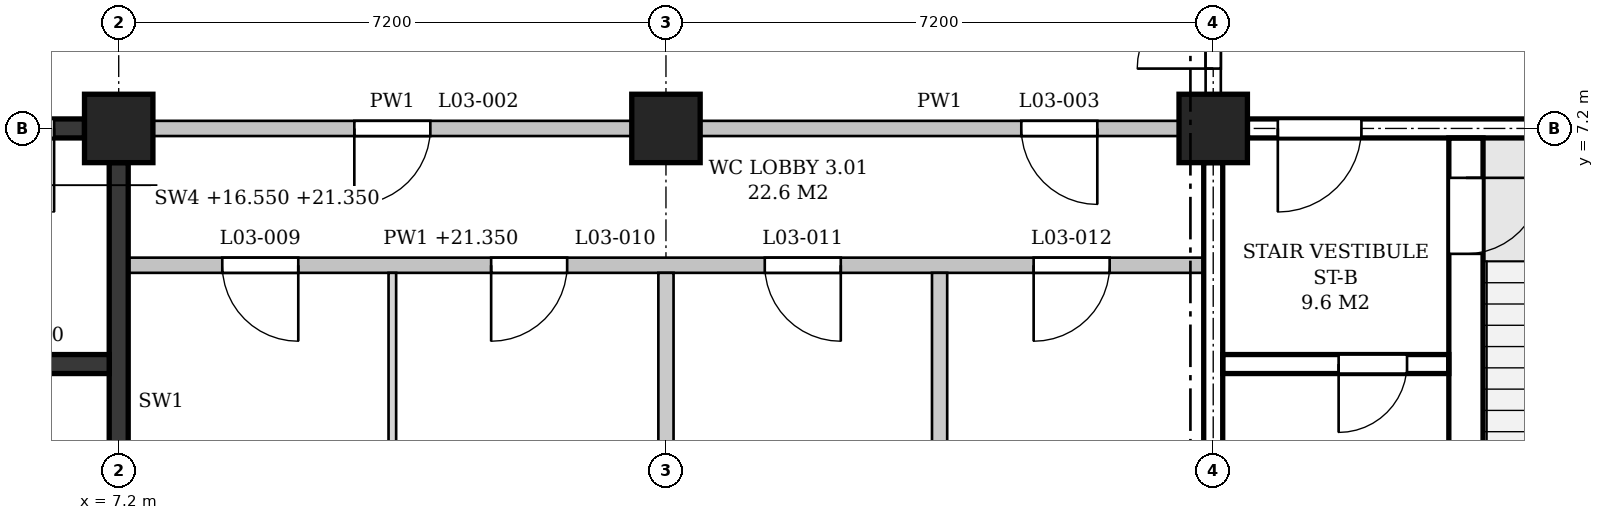
"""IFC4 building model, lengths in metres.
Left out: names, types, materials, properties, quantities, classifications, styles, units other than length and angle.
Written with IfcOpenShell. Run it as: python <this file> out.ifc"""

import sys

from ifc_helpers import new_model, si_unit, direction, frame, frame_2d, origin, origin_2d, place, context, subcontext, project, spatial, polyline, rectangle, outline, extrude, element, fill, save


model = new_model("IFC4")
c1 = context("Model", 3, precision=1e-05, world=origin(), true_north=direction((0.0, 1.0)))
c2 = subcontext(c1, "Body", "Model", "MODEL_VIEW")
j1 = project(units=[si_unit("LENGTHUNIT", "METRE"), si_unit("PLANEANGLEUNIT", "RADIAN")], contexts=[c1])
p1 = place(None, origin())
s1 = spatial("IfcSite", under=j1, at=p1, CompositionType="ELEMENT")
p2 = place(p1, origin())
s2 = spatial("IfcBuilding", under=s1, at=p2, CompositionType="ELEMENT")
p3 = place(p2, frame((0.0, 0.0, 16.8)))
s3 = spatial("IfcBuildingStorey", under=s2, at=p3, CompositionType="ELEMENT", Elevation=16.8)
for number, where, z_axis, x_axis in (
    (1, (7.2, 7.2, 0.0), (0.0, 0.0, 1.0), (1.0, 0.0, 0.0)),
    (2, (14.4, 7.2, 0.0), (0.0, 0.0, 1.0), (1.0, 0.0, 0.0)),
    (3, (21.6, 7.2, 0.0), (0.0, 0.0, 1.0), (1.0, 0.0, 0.0)),
):
    element("IfcColumn", number, at=place(p3, frame(where, z_axis=z_axis, x_axis=x_axis)), inside=s3, PredefinedType="COLUMN", context=c2, shape_type="SweptSolid", body=[
        extrude(rectangle(XDim=0.9, YDim=0.9, at=origin_2d()), origin(), (0.0, 0.0, 1.0), 4.8),
    ])
p4 = place(p3, frame((0.45, 7.2, 0.0), z_axis=(0.0, 0.0, 1.0), x_axis=(1.0, 0.0, 0.0)))
e4 = element("IfcWall", 4, at=p4, inside=s3, PredefinedType="SHEAR", context=c2, shape_type="SweptSolid", body=[
    extrude(rectangle(XDim=6.3, YDim=0.25, at=frame_2d((3.15, 0.0))), origin(), (0.0, 0.0, 1.0), 3.8),
])
p5 = place(p4, frame((4.8, 0.0, 0.0)))
e5 = element("IfcOpeningElement", 5, at=p5, cuts=e4, PredefinedType="OPENING", context=c2, shape_type="SweptSolid", body=[
    extrude(rectangle(XDim=1.1, YDim=2.1, at=frame_2d((0.55, 1.05))), frame((0.0, 0.135, 0.0), z_axis=(0.0, -1.0, 0.0), x_axis=(1.0, 0.0, 0.0)), (0.0, 0.0, 1.0), 0.27),
])
p6 = place(p3, frame((7.2, 0.45, 0.0), z_axis=(0.0, 0.0, 1.0), x_axis=(0.0, 1.0, 0.0)))
e6 = element("IfcWall", 6, at=p6, inside=s3, PredefinedType="SHEAR", context=c2, shape_type="SweptSolid", body=[
    extrude(rectangle(XDim=6.3, YDim=0.25, at=frame_2d((3.15, 0.0))), origin(), (0.0, 0.0, 1.0), 3.8),
])
p7 = place(p3, frame((4.1, 4.1, 0.0), z_axis=(0.0, 0.0, 1.0), x_axis=(1.0, 0.0, 0.0)))
e7 = element("IfcWall", 7, at=p7, inside=s3, PredefinedType="SHEAR", context=c2, shape_type="SweptSolid", body=[
    extrude(rectangle(XDim=2.975, YDim=0.25, at=frame_2d((1.487, 0.0))), origin(), (0.0, 0.0, 1.0), 4.55),
])
p8 = place(p7, frame((0.55, 0.0, 0.0)))
e8 = element("IfcOpeningElement", 8, at=p8, cuts=e7, PredefinedType="OPENING", context=c2, shape_type="SweptSolid", body=[
    extrude(rectangle(XDim=0.9, YDim=2.1, at=frame_2d((0.45, 1.05))), frame((0.0, 0.135, 0.0), z_axis=(0.0, -1.0, 0.0), x_axis=(1.0, 0.0, 0.0)), (0.0, 0.0, 1.0), 0.27),
])
p9 = place(p3, frame((22.05, 7.2, 0.0), z_axis=(0.0, 0.0, 1.0), x_axis=(1.0, 0.0, 0.0)))
e9 = element("IfcWall", 9, at=p9, inside=s3, PredefinedType="SHEAR", context=c2, shape_type="SweptSolid", body=[
    extrude(rectangle(XDim=6.3, YDim=0.25, at=frame_2d((3.15, 0.0))), origin(), (0.0, 0.0, 1.0), 3.8),
])
p10 = place(p9, frame((0.4, 0.0, 0.0)))
e10 = element("IfcOpeningElement", 10, at=p10, cuts=e9, PredefinedType="OPENING", context=c2, shape_type="SweptSolid", body=[
    extrude(rectangle(XDim=1.1, YDim=2.1, at=frame_2d((0.55, 1.05))), frame((0.0, 0.135, 0.0), z_axis=(0.0, -1.0, 0.0), x_axis=(1.0, 0.0, 0.0)), (0.0, 0.0, 1.0), 0.27),
])
p11 = place(p3, frame((21.6, 0.45, 0.0), z_axis=(0.0, 0.0, 1.0), x_axis=(0.0, 1.0, 0.0)))
e11 = element("IfcWall", 11, at=p11, inside=s3, PredefinedType="SHEAR", context=c2, shape_type="SweptSolid", body=[
    extrude(rectangle(XDim=6.3, YDim=0.25, at=frame_2d((3.15, 0.0))), origin(), (0.0, 0.0, 1.0), 3.8),
])
p12 = place(p3, frame((24.925, 0.225, 0.0), z_axis=(0.0, 0.0, 1.0), x_axis=(0.0, 1.0, 0.0)))
e12 = element("IfcWall", 12, at=p12, inside=s3, PredefinedType="SHEAR", context=c2, shape_type="SweptSolid", body=[
    extrude(rectangle(XDim=6.85, YDim=0.45, at=frame_2d((3.425, 0.0))), origin(), (0.0, 0.0, 1.0), 4.55),
])
p13 = place(p12, frame((5.325, 0.0, 0.0)))
e13 = element("IfcOpeningElement", 13, at=p13, cuts=e12, PredefinedType="OPENING", context=c2, shape_type="SweptSolid", body=[
    extrude(rectangle(XDim=1.0, YDim=2.1, at=frame_2d((0.5, 1.05))), frame((0.0, 0.235, 0.0), z_axis=(0.0, -1.0, 0.0), x_axis=(1.0, 0.0, 0.0)), (0.0, 0.0, 1.0), 0.47),
])
p14 = place(p3, frame((21.725, 4.1, 0.0), z_axis=(0.0, 0.0, 1.0), x_axis=(1.0, 0.0, 0.0)))
e14 = element("IfcWall", 14, at=p14, inside=s3, PredefinedType="SHEAR", context=c2, shape_type="SweptSolid", body=[
    extrude(rectangle(XDim=2.975, YDim=0.25, at=frame_2d((1.487, 0.0))), origin(), (0.0, 0.0, 1.0), 4.55),
])
p15 = place(p14, frame((1.525, 0.0, 0.0)))
e15 = element("IfcOpeningElement", 15, at=p15, cuts=e14, PredefinedType="OPENING", context=c2, shape_type="SweptSolid", body=[
    extrude(rectangle(XDim=0.9, YDim=2.1, at=frame_2d((0.45, 1.05))), frame((0.0, 0.135, 0.0), z_axis=(0.0, -1.0, 0.0), x_axis=(1.0, 0.0, 0.0)), (0.0, 0.0, 1.0), 0.27),
])
p16 = place(p3, frame((7.325, 5.4, 0.0), z_axis=(0.0, 0.0, 1.0), x_axis=(1.0, 0.0, 0.0)))
e16 = element("IfcWall", 16, at=p16, inside=s3, PredefinedType="PARTITIONING", context=c2, shape_type="SweptSolid", body=[
    extrude(outline(polyline([(0.0, 0.0), (14.15, 0.0), (14.15, 3.8), (14.025, 3.8), (14.025, 4.55), (7.325, 4.55), (7.325, 3.8), (6.825, 3.8), (6.825, 4.55), (0.125, 4.55), (0.125, 3.8), (0.0, 3.8), (0.0, 0.0)])), frame((0.0, 0.1, 0.0), z_axis=(0.0, -1.0, 0.0), x_axis=(1.0, 0.0, 0.0)), (0.0, 0.0, 1.0), 0.2),
])
p17 = place(p16, frame((1.238, 0.0, 0.0)))
e17 = element("IfcOpeningElement", 17, at=p17, cuts=e16, PredefinedType="OPENING", context=c2, shape_type="SweptSolid", body=[
    extrude(rectangle(XDim=1.0, YDim=2.1, at=frame_2d((0.5, 1.05))), frame((0.0, 0.11, 0.0), z_axis=(0.0, -1.0, 0.0), x_axis=(1.0, 0.0, 0.0)), (0.0, 0.0, 1.0), 0.22),
])
p18 = place(p16, frame((4.775, 0.0, 0.0)))
e18 = element("IfcOpeningElement", 18, at=p18, cuts=e16, PredefinedType="OPENING", context=c2, shape_type="SweptSolid", body=[
    extrude(rectangle(XDim=1.0, YDim=2.1, at=frame_2d((0.5, 1.05))), frame((0.0, 0.11, 0.0), z_axis=(0.0, -1.0, 0.0), x_axis=(1.0, 0.0, 0.0)), (0.0, 0.0, 1.0), 0.22),
])
p19 = place(p16, frame((8.375, 0.0, 0.0)))
e19 = element("IfcOpeningElement", 19, at=p19, cuts=e16, PredefinedType="OPENING", context=c2, shape_type="SweptSolid", body=[
    extrude(rectangle(XDim=1.0, YDim=2.1, at=frame_2d((0.5, 1.05))), frame((0.0, 0.11, 0.0), z_axis=(0.0, -1.0, 0.0), x_axis=(1.0, 0.0, 0.0)), (0.0, 0.0, 1.0), 0.22),
])
p20 = place(p16, frame((11.913, 0.0, 0.0)))
e20 = element("IfcOpeningElement", 20, at=p20, cuts=e16, PredefinedType="OPENING", context=c2, shape_type="SweptSolid", body=[
    extrude(rectangle(XDim=1.0, YDim=2.1, at=frame_2d((0.5, 1.05))), frame((0.0, 0.11, 0.0), z_axis=(0.0, -1.0, 0.0), x_axis=(1.0, 0.0, 0.0)), (0.0, 0.0, 1.0), 0.22),
])
p21 = place(p3, frame((7.65, 7.2, 0.0), z_axis=(0.0, 0.0, 1.0), x_axis=(1.0, 0.0, 0.0)))
e21 = element("IfcWall", 21, at=p21, inside=s3, PredefinedType="PARTITIONING", context=c2, shape_type="SweptSolid", body=[
    extrude(rectangle(XDim=6.3, YDim=0.2, at=frame_2d((3.15, 0.0))), origin(), (0.0, 0.0, 1.0), 3.8),
])
p22 = place(p21, frame((2.65, 0.0, 0.0)))
e22 = element("IfcOpeningElement", 22, at=p22, cuts=e21, PredefinedType="OPENING", context=c2, shape_type="SweptSolid", body=[
    extrude(rectangle(XDim=1.0, YDim=2.1, at=frame_2d((0.5, 1.05))), frame((0.0, 0.11, 0.0), z_axis=(0.0, -1.0, 0.0), x_axis=(1.0, 0.0, 0.0)), (0.0, 0.0, 1.0), 0.22),
])
p23 = place(p3, frame((14.85, 7.2, 0.0), z_axis=(0.0, 0.0, 1.0), x_axis=(1.0, 0.0, 0.0)))
e23 = element("IfcWall", 23, at=p23, inside=s3, PredefinedType="PARTITIONING", context=c2, shape_type="SweptSolid", body=[
    extrude(rectangle(XDim=6.3, YDim=0.2, at=frame_2d((3.15, 0.0))), origin(), (0.0, 0.0, 1.0), 3.8),
])
p24 = place(p23, frame((4.225, 0.0, 0.0)))
e24 = element("IfcOpeningElement", 24, at=p24, cuts=e23, PredefinedType="OPENING", context=c2, shape_type="SweptSolid", body=[
    extrude(rectangle(XDim=1.0, YDim=2.1, at=frame_2d((0.5, 1.05))), frame((0.0, 0.11, 0.0), z_axis=(0.0, -1.0, 0.0), x_axis=(1.0, 0.0, 0.0)), (0.0, 0.0, 1.0), 0.22),
])
p25 = place(p3, frame((10.8, 0.15, 0.0), z_axis=(0.0, 0.0, 1.0), x_axis=(0.0, 1.0, 0.0)))
e25 = element("IfcWall", 25, at=p25, inside=s3, PredefinedType="PARTITIONING", context=c2, shape_type="SweptSolid", body=[
    extrude(rectangle(XDim=5.15, YDim=0.1, at=frame_2d((2.575, 0.0))), origin(), (0.0, 0.0, 1.0), 3.8),
])
p26 = place(p3, frame((14.4, 0.45, 0.0), z_axis=(0.0, 0.0, 1.0), x_axis=(0.0, 1.0, 0.0)))
e26 = element("IfcWall", 26, at=p26, inside=s3, PredefinedType="PARTITIONING", context=c2, shape_type="SweptSolid", body=[
    extrude(rectangle(XDim=4.85, YDim=0.2, at=frame_2d((2.425, 0.0))), origin(), (0.0, 0.0, 1.0), 3.8),
])
p27 = place(p3, frame((18.0, 0.15, 0.0), z_axis=(0.0, 0.0, 1.0), x_axis=(0.0, 1.0, 0.0)))
e27 = element("IfcWall", 27, at=p27, inside=s3, PredefinedType="PARTITIONING", context=c2, shape_type="SweptSolid", body=[
    extrude(outline(polyline([(0.0, 0.0), (5.15, 0.0), (5.15, 4.55), (0.1, 4.55), (0.1, 3.95), (0.0, 3.95), (0.0, 0.0)])), frame((0.0, 0.1, 0.0), z_axis=(0.0, -1.0, 0.0), x_axis=(1.0, 0.0, 0.0)), (0.0, 0.0, 1.0), 0.2),
])
p28 = place(p3, frame((21.6, 7.65, 0.0), z_axis=(0.0, 0.0, 1.0), x_axis=(0.0, 1.0, 0.0)))
e28 = element("IfcWall", 28, at=p28, inside=s3, PredefinedType="PARTITIONING", context=c2, shape_type="SweptSolid", body=[
    extrude(rectangle(XDim=2.675, YDim=0.2, at=frame_2d((1.337, 0.0))), origin(), (0.0, 0.0, 1.0), 3.8),
])
p29 = place(p28, frame((0.337, 0.0, 0.0)))
e29 = element("IfcOpeningElement", 29, at=p29, cuts=e28, PredefinedType="OPENING", context=c2, shape_type="SweptSolid", body=[
    extrude(rectangle(XDim=2.0, YDim=2.4, at=frame_2d((1.0, 1.2))), frame((0.0, 0.11, 0.0), z_axis=(0.0, -1.0, 0.0), x_axis=(1.0, 0.0, 0.0)), (0.0, 0.0, 1.0), 0.22),
])
p30 = place(p5, frame((1.1, 0.0, 0.0), z_axis=(0.0, 0.0, 1.0), x_axis=(-1.0, 0.0, 0.0)))
e30 = element("IfcDoor", 30, at=p30, inside=s3, OperationType="SINGLE_SWING_LEFT", PredefinedType="DOOR", context=c2, shape_type="SweptSolid", body=[
    extrude(rectangle(XDim=1.1, YDim=2.1, at=frame_2d((0.55, 1.05))), frame((0.0, 0.025, 0.0), z_axis=(0.0, -1.0, 0.0), x_axis=(1.0, 0.0, 0.0)), (0.0, 0.0, 1.0), 0.05),
])
fill(e5, e30)
p31 = place(p13, frame((1.0, 0.0, 0.0), z_axis=(0.0, 0.0, 1.0), x_axis=(-1.0, 0.0, 0.0)))
e31 = element("IfcDoor", 31, at=p31, inside=s3, OperationType="SINGLE_SWING_LEFT", PredefinedType="DOOR", context=c2, shape_type="SweptSolid", body=[
    extrude(rectangle(XDim=1.0, YDim=2.1, at=frame_2d((0.5, 1.05))), frame((0.0, 0.025, 0.0), z_axis=(0.0, -1.0, 0.0), x_axis=(1.0, 0.0, 0.0)), (0.0, 0.0, 1.0), 0.05),
])
fill(e13, e31)
p32 = place(p10, frame((1.1, 0.0, 0.0), z_axis=(0.0, 0.0, 1.0), x_axis=(-1.0, 0.0, 0.0)))
e32 = element("IfcDoor", 32, at=p32, inside=s3, OperationType="SINGLE_SWING_RIGHT", PredefinedType="DOOR", context=c2, shape_type="SweptSolid", body=[
    extrude(rectangle(XDim=1.1, YDim=2.1, at=frame_2d((0.55, 1.05))), frame((0.0, 0.025, 0.0), z_axis=(0.0, -1.0, 0.0), x_axis=(1.0, 0.0, 0.0)), (0.0, 0.0, 1.0), 0.05),
])
fill(e10, e32)
p33 = place(p15, frame((0.9, 0.0, 0.0), z_axis=(0.0, 0.0, 1.0), x_axis=(-1.0, 0.0, 0.0)))
e33 = element("IfcDoor", 33, at=p33, inside=s3, OperationType="SINGLE_SWING_RIGHT", PredefinedType="DOOR", context=c2, shape_type="SweptSolid", body=[
    extrude(rectangle(XDim=0.9, YDim=2.1, at=frame_2d((0.45, 1.05))), frame((0.0, 0.025, 0.0), z_axis=(0.0, -1.0, 0.0), x_axis=(1.0, 0.0, 0.0)), (0.0, 0.0, 1.0), 0.05),
])
fill(e15, e33)
p34 = place(p29, origin())
e34 = element("IfcDoor", 34, at=p34, inside=s3, OperationType="DOUBLE_DOOR_SINGLE_SWING", PredefinedType="DOOR", context=c2, shape_type="SweptSolid", body=[
    extrude(rectangle(XDim=2.0, YDim=2.4, at=frame_2d((1.0, 1.2))), frame((0.0, 0.025, 0.0), z_axis=(0.0, -1.0, 0.0), x_axis=(1.0, 0.0, 0.0)), (0.0, 0.0, 1.0), 0.05),
])
fill(e29, e34)
p35 = place(p22, frame((1.0, 0.0, 0.0), z_axis=(0.0, 0.0, 1.0), x_axis=(-1.0, 0.0, 0.0)))
e35 = element("IfcDoor", 35, at=p35, inside=s3, OperationType="SINGLE_SWING_RIGHT", PredefinedType="DOOR", context=c2, shape_type="SweptSolid", body=[
    extrude(rectangle(XDim=1.0, YDim=2.1, at=frame_2d((0.5, 1.05))), frame((0.0, 0.025, 0.0), z_axis=(0.0, -1.0, 0.0), x_axis=(1.0, 0.0, 0.0)), (0.0, 0.0, 1.0), 0.05),
])
fill(e22, e35)
p36 = place(p24, frame((1.0, 0.0, 0.0), z_axis=(0.0, 0.0, 1.0), x_axis=(-1.0, 0.0, 0.0)))
e36 = element("IfcDoor", 36, at=p36, inside=s3, OperationType="SINGLE_SWING_LEFT", PredefinedType="DOOR", context=c2, shape_type="SweptSolid", body=[
    extrude(rectangle(XDim=1.0, YDim=2.1, at=frame_2d((0.5, 1.05))), frame((0.0, 0.025, 0.0), z_axis=(0.0, -1.0, 0.0), x_axis=(1.0, 0.0, 0.0)), (0.0, 0.0, 1.0), 0.05),
])
fill(e24, e36)
p37 = place(p17, frame((1.0, 0.0, 0.0), z_axis=(0.0, 0.0, 1.0), x_axis=(-1.0, 0.0, 0.0)))
e37 = element("IfcDoor", 37, at=p37, inside=s3, OperationType="SINGLE_SWING_LEFT", PredefinedType="DOOR", context=c2, shape_type="SweptSolid", body=[
    extrude(rectangle(XDim=1.0, YDim=2.1, at=frame_2d((0.5, 1.05))), frame((0.0, 0.025, 0.0), z_axis=(0.0, -1.0, 0.0), x_axis=(1.0, 0.0, 0.0)), (0.0, 0.0, 1.0), 0.05),
])
fill(e17, e37)
p38 = place(p18, frame((1.0, 0.0, 0.0), z_axis=(0.0, 0.0, 1.0), x_axis=(-1.0, 0.0, 0.0)))
e38 = element("IfcDoor", 38, at=p38, inside=s3, OperationType="SINGLE_SWING_RIGHT", PredefinedType="DOOR", context=c2, shape_type="SweptSolid", body=[
    extrude(rectangle(XDim=1.0, YDim=2.1, at=frame_2d((0.5, 1.05))), frame((0.0, 0.025, 0.0), z_axis=(0.0, -1.0, 0.0), x_axis=(1.0, 0.0, 0.0)), (0.0, 0.0, 1.0), 0.05),
])
fill(e18, e38)
p39 = place(p19, frame((1.0, 0.0, 0.0), z_axis=(0.0, 0.0, 1.0), x_axis=(-1.0, 0.0, 0.0)))
e39 = element("IfcDoor", 39, at=p39, inside=s3, OperationType="SINGLE_SWING_LEFT", PredefinedType="DOOR", context=c2, shape_type="SweptSolid", body=[
    extrude(rectangle(XDim=1.0, YDim=2.1, at=frame_2d((0.5, 1.05))), frame((0.0, 0.025, 0.0), z_axis=(0.0, -1.0, 0.0), x_axis=(1.0, 0.0, 0.0)), (0.0, 0.0, 1.0), 0.05),
])
fill(e19, e39)
p40 = place(p20, frame((1.0, 0.0, 0.0), z_axis=(0.0, 0.0, 1.0), x_axis=(-1.0, 0.0, 0.0)))
e40 = element("IfcDoor", 40, at=p40, inside=s3, OperationType="SINGLE_SWING_RIGHT", PredefinedType="DOOR", context=c2, shape_type="SweptSolid", body=[
    extrude(rectangle(XDim=1.0, YDim=2.1, at=frame_2d((0.5, 1.05))), frame((0.0, 0.025, 0.0), z_axis=(0.0, -1.0, 0.0), x_axis=(1.0, 0.0, 0.0)), (0.0, 0.0, 1.0), 0.05),
])
fill(e20, e40)
save(model, sys.argv[1])
